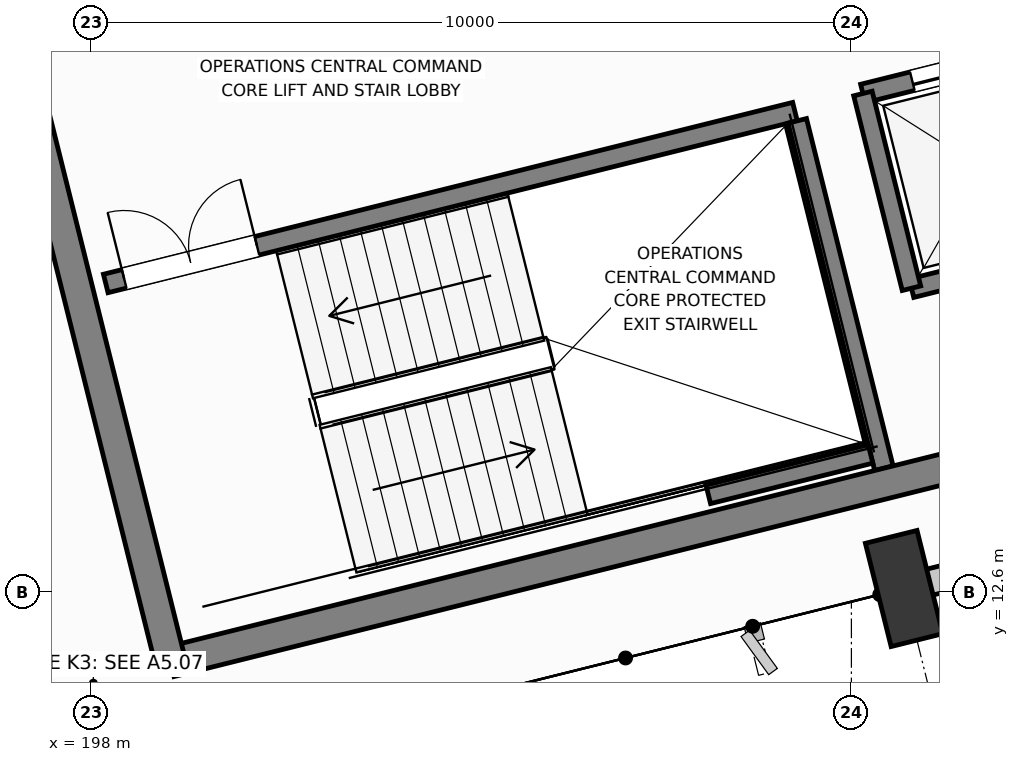
"""IFC4 building model, lengths in metres.
Left out: names, types, materials, properties, quantities, classifications, styles, units other than length and angle.
Written with IfcOpenShell. Run it as: python <this file> out.ifc"""

import sys

from ifc_helpers import new_model, si_unit, direction, frame, frame_2d, origin, origin_2d, place, context, subcontext, project, spatial, rectangle, extrude, element, fill, save


model = new_model("IFC4")
c1 = context("Model", 3, precision=1e-05, world=origin(), true_north=direction((0.0, 1.0)))
c2 = subcontext(c1, "Body", "Model", "MODEL_VIEW")
j1 = project(units=[si_unit("LENGTHUNIT", "METRE"), si_unit("PLANEANGLEUNIT", "RADIAN")], contexts=[c1])
p1 = place(None, origin())
s1 = spatial("IfcSite", under=j1, at=p1, CompositionType="ELEMENT")
p2 = place(p1, origin())
s2 = spatial("IfcBuilding", under=s1, at=p2, CompositionType="ELEMENT")
p3 = place(p2, frame((0.0, 0.0, 16.2)))
s3 = spatial("IfcBuildingStorey", under=s2, at=p3, CompositionType="ELEMENT", Elevation=16.2)
p4 = place(p3, frame((208.693, 12.645, 0.0), z_axis=(0.0, 0.0, 1.0), x_axis=(0.970295726276, 0.2419218956, 0.0)))
e1 = element("IfcColumn", 1, at=p4, inside=s3, PredefinedType="COLUMN", context=c2, shape_type="SweptSolid", body=[
    extrude(rectangle(XDim=0.7, YDim=1.4, at=origin_2d()), origin(), (0.0, 0.0, 1.0), 4.2),
])
p5 = place(p3, frame((208.999, 12.721, 0.0), z_axis=(0.0, 0.0, 1.0), x_axis=(0.970297165187, 0.241916124371, 0.0)))
e2 = element("IfcWall", 2, at=p5, inside=s3, PredefinedType="STANDARD", context=c2, shape_type="SweptSolid", body=[
    extrude(rectangle(XDim=10.37, YDim=0.35, at=frame_2d((5.185, 0.0))), origin(), (0.0, 0.0, 1.0), 3.195),
])
p6 = place(p5, frame((1.692, 0.0, 0.85)))
e3 = element("IfcOpeningElement", 3, at=p6, cuts=e2, PredefinedType="OPENING", context=c2, shape_type="SweptSolid", body=[
    extrude(rectangle(XDim=1.8, YDim=1.65, at=frame_2d((0.9, 0.825))), frame((0.0, 0.185, 0.0), z_axis=(0.0, -1.0, 0.0), x_axis=(1.0, 0.0, 0.0)), (0.0, 0.0, 1.0), 0.37),
])
p7 = place(p5, frame((6.877, 0.0, 0.85)))
e4 = element("IfcOpeningElement", 4, at=p7, cuts=e2, PredefinedType="OPENING", context=c2, shape_type="SweptSolid", body=[
    extrude(rectangle(XDim=1.8, YDim=1.65, at=frame_2d((0.9, 0.825))), frame((0.0, 0.185, 0.0), z_axis=(0.0, -1.0, 0.0), x_axis=(1.0, 0.0, 0.0)), (0.0, 0.0, 1.0), 0.37),
])
p8 = place(p3, frame((208.79, 16.595, 0.0), z_axis=(0.0, 0.0, 1.0), x_axis=(0.97029284861, 0.241933436994, 0.0)))
e5 = element("IfcWall", 5, at=p8, inside=s3, PredefinedType="SOLIDWALL", context=c2, shape_type="SweptSolid", body=[
    extrude(rectangle(XDim=2.54, YDim=0.25, at=frame_2d((1.27, 0.0))), origin(), (0.0, 0.0, 1.0), 3.87),
])
p9 = place(p3, frame((210.616, 19.771, 0.0), z_axis=(0.0, 0.0, 1.0), x_axis=(-0.97029284861, -0.241933436994, 0.0)))
e6 = element("IfcWall", 6, at=p9, inside=s3, PredefinedType="SOLIDWALL", context=c2, shape_type="SweptSolid", body=[
    extrude(rectangle(XDim=2.54, YDim=0.25, at=frame_2d((1.27, 0.0))), origin(), (0.0, 0.0, 1.0), 3.87),
])
p10 = place(p9, frame((0.67, 0.0, 0.0)))
e7 = element("IfcOpeningElement", 7, at=p10, cuts=e6, PredefinedType="OPENING", context=c2, shape_type="SweptSolid", body=[
    extrude(rectangle(XDim=1.2, YDim=2.2, at=frame_2d((0.6, 1.1))), frame((0.0, 0.135, 0.0), z_axis=(0.0, -1.0, 0.0), x_axis=(1.0, 0.0, 0.0)), (0.0, 0.0, 1.0), 0.27),
])
p11 = place(p3, frame((208.151, 19.157, 0.0), z_axis=(0.0, 0.0, 1.0), x_axis=(0.241938414856, -0.970291607413, 0.0)))
e8 = element("IfcWall", 8, at=p11, inside=s3, PredefinedType="SOLIDWALL", context=c2, shape_type="SweptSolid", body=[
    extrude(rectangle(XDim=2.64, YDim=0.25, at=frame_2d((1.32, 0.0))), origin(), (0.0, 0.0, 1.0), 3.87),
])
p12 = place(p3, frame((198.19, 16.658, 0.0), z_axis=(0.0, 0.0, 1.0), x_axis=(0.970297151331, 0.241916179943, 0.0)))
e9 = element("IfcWall", 9, at=p12, inside=s3, PredefinedType="SOLIDWALL", context=c2, shape_type="SweptSolid", body=[
    extrude(rectangle(XDim=9.345, YDim=0.25, at=frame_2d((4.673, 0.0))), origin(), (0.0, 0.0, 1.0), 3.84),
])
p13 = place(p12, frame((0.25, 0.0, 0.0)))
e10 = element("IfcOpeningElement", 10, at=p13, cuts=e9, PredefinedType="OPENING", context=c2, shape_type="SweptSolid", body=[
    extrude(rectangle(XDim=1.8, YDim=2.25, at=frame_2d((0.9, 1.125))), frame((0.0, 0.135, 0.0), z_axis=(0.0, -1.0, 0.0), x_axis=(1.0, 0.0, 0.0)), (0.0, 0.0, 1.0), 0.27),
])
p14 = place(p3, frame((208.427, 14.227, 0.0), z_axis=(0.0, 0.0, 1.0), x_axis=(-0.241911120435, 0.970298412763, 0.0)))
e11 = element("IfcWall", 11, at=p14, inside=s3, PredefinedType="SOLIDWALL", context=c2, shape_type="SweptSolid", body=[
    extrude(rectangle(XDim=4.71, YDim=0.25, at=frame_2d((2.355, 0.0))), origin(), (0.0, 0.0, 1.0), 3.84),
])
p15 = place(p3, frame((206.117, 13.883, 0.0), z_axis=(0.0, 0.0, 1.0), x_axis=(0.97029738597, 0.241915238833, 0.0)))
e12 = element("IfcWall", 12, at=p15, inside=s3, PredefinedType="SOLIDWALL", context=c2, shape_type="SweptSolid", body=[
    extrude(rectangle(XDim=2.2, YDim=0.25, at=frame_2d((1.1, 0.0))), origin(), (0.0, 0.0, 1.0), 3.84),
])
p16 = place(p3, frame((199.04, 11.681, 0.0), z_axis=(0.0, 0.0, 1.0), x_axis=(0.970295578967, 0.241922486422, 0.0)))
e13 = element("IfcWall", 13, at=p16, inside=s3, PredefinedType="SHEAR", context=c2, shape_type="SweptSolid", body=[
    extrude(rectangle(XDim=14.2, YDim=0.4, at=frame_2d((7.1, 0.0))), origin(), (0.0, 0.0, 1.0), 3.87),
])
p17 = place(p3, frame((196.862, 20.413, 0.0), z_axis=(0.0, 0.0, 1.0), x_axis=(0.241921199913, -0.97029589973, 0.0)))
e14 = element("IfcWall", 14, at=p17, inside=s3, PredefinedType="SHEAR", context=c2, shape_type="SweptSolid", body=[
    extrude(rectangle(XDim=9.0, YDim=0.4, at=frame_2d((4.5, 0.0))), origin(), (0.0, 0.0, 1.0), 3.87),
])
p18 = place(p10, origin())
e15 = element("IfcDoor", 15, at=p18, inside=s3, OperationType="SLIDING_TO_LEFT", PredefinedType="DOOR", context=c2, shape_type="SweptSolid", body=[
    extrude(rectangle(XDim=1.2, YDim=2.2, at=frame_2d((0.6, 1.1))), frame((0.0, 0.025, 0.0), z_axis=(0.0, -1.0, 0.0), x_axis=(1.0, 0.0, 0.0)), (0.0, 0.0, 1.0), 0.05),
])
fill(e7, e15)
p19 = place(p13, origin())
e16 = element("IfcDoor", 16, at=p19, inside=s3, OperationType="DOUBLE_DOOR_SINGLE_SWING", PredefinedType="DOOR", context=c2, shape_type="SweptSolid", body=[
    extrude(rectangle(XDim=1.8, YDim=2.25, at=frame_2d((0.9, 1.125))), frame((0.0, 0.025, 0.0), z_axis=(0.0, -1.0, 0.0), x_axis=(1.0, 0.0, 0.0)), (0.0, 0.0, 1.0), 0.05),
])
fill(e10, e16)
save(model, sys.argv[1])
